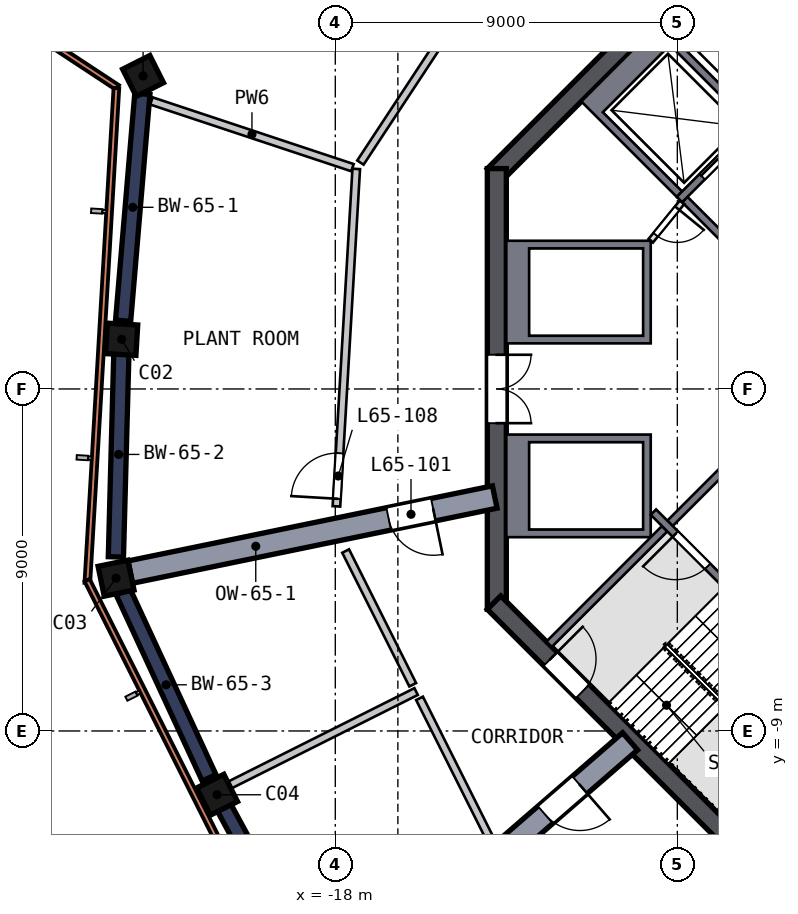
"""IFC4 building model, lengths in metres.
Left out: names, types, materials, properties, quantities, classifications, styles, units other than length and angle.
Written with IfcOpenShell. Run it as: python <this file> out.ifc"""

import sys

from ifc_helpers import new_model, si_unit, direction, frame, frame_2d, origin, origin_2d, place, context, subcontext, project, spatial, polyline, rectangle, outline, extrude, element, fill, save


model = new_model("IFC4")
c1 = context("Model", 3, precision=1e-05, world=origin(), true_north=direction((0.0, 1.0)))
c2 = subcontext(c1, "Body", "Model", "MODEL_VIEW")
j1 = project(units=[si_unit("LENGTHUNIT", "METRE"), si_unit("PLANEANGLEUNIT", "RADIAN")], contexts=[c1])
p1 = place(None, origin())
s1 = spatial("IfcSite", under=j1, at=p1, CompositionType="ELEMENT")
p2 = place(p1, origin())
s2 = spatial("IfcBuilding", under=s1, at=p2, CompositionType="ELEMENT")
p3 = place(p2, frame((0.0, 0.0, 263.0)))
s3 = spatial("IfcBuildingStorey", under=s2, at=p3, CompositionType="ELEMENT", Elevation=263.0)
p4 = place(p3, frame((-23.031, 8.314, 0.0), z_axis=(-0.022679221, -0.064357024, 0.997669197), x_axis=(-0.449308956, 0.892121569, 0.04733464)))
e1 = element("IfcColumn", 1, at=p4, inside=s3, PredefinedType="COLUMN", context=c2, shape_type="SweptSolid", body=[
    extrude(rectangle(XDim=0.8, YDim=0.8, at=origin_2d()), origin(), (0.0, 0.0, 1.0), 4.51),
])
p5 = place(p3, frame((-23.618, 1.387, 0.0), z_axis=(-0.003302254, -0.065882664, 0.997821913), x_axis=(-0.058334022, -0.996115464, -0.065963048)))
e2 = element("IfcColumn", 2, at=p5, inside=s3, PredefinedType="COLUMN", context=c2, shape_type="SweptSolid", body=[
    extrude(rectangle(XDim=0.8, YDim=0.8, at=origin_2d()), origin(), (0.0, 0.0, 1.0), 4.51),
])
p6 = place(p3, frame((-23.786, -4.9, 0.0), z_axis=(0.014181847, -0.066145867, 0.997709176), x_axis=(-0.20094066, 0.977264945, 0.067646713)))
e3 = element("IfcColumn", 3, at=p6, inside=s3, PredefinedType="COLUMN", context=c2, shape_type="SweptSolid", body=[
    extrude(rectangle(XDim=0.8, YDim=0.8, at=origin_2d()), origin(), (0.0, 0.0, 1.0), 4.51),
])
p7 = place(p3, frame((-21.147, -10.608, 0.0), z_axis=(0.03004517, -0.058682818, 0.997824441), x_axis=(0.447253105, -0.891974541, -0.065924798)))
e4 = element("IfcColumn", 4, at=p7, inside=s3, PredefinedType="COLUMN", context=c2, shape_type="SweptSolid", body=[
    extrude(rectangle(XDim=0.8, YDim=0.8, at=origin_2d()), origin(), (0.0, 0.0, 1.0), 4.51),
])
p8 = place(p3, frame((-5.622, 13.823, 0.0), z_axis=(0.0, 0.0, 1.0), x_axis=(-0.707106781, -0.707106781, 0.0)))
e5 = element("IfcWall", 5, at=p8, inside=s3, PredefinedType="SHEAR", context=c2, shape_type="SweptSolid", body=[
    extrude(rectangle(XDim=11.598, YDim=0.5, at=frame_2d((5.799, 0.0))), origin(), (0.0, 0.0, 1.0), 6.0),
])
p9 = place(p3, frame((-13.75, 5.799, 0.0), z_axis=(0.0, 0.0, 1.0), x_axis=(0.0, -1.0, 0.0)))
e6 = element("IfcWall", 6, at=p9, inside=s3, PredefinedType="SHEAR", context=c2, shape_type="SweptSolid", body=[
    extrude(rectangle(XDim=11.598, YDim=0.5, at=frame_2d((5.799, 0.0))), origin(), (0.0, 0.0, 1.0), 6.0),
])
p10 = place(p9, frame((4.899, 0.0, 0.0)))
e7 = element("IfcOpeningElement", 7, at=p10, cuts=e6, PredefinedType="OPENING", context=c2, shape_type="SweptSolid", body=[
    extrude(rectangle(XDim=1.8, YDim=2.1, at=frame_2d((0.9, 1.05))), frame((0.0, 0.26, 0.0), z_axis=(0.0, -1.0, 0.0), x_axis=(1.0, 0.0, 0.0)), (0.0, 0.0, 1.0), 0.52),
])
p11 = place(p3, frame((-13.823, -5.622, 0.0), z_axis=(0.0, 0.0, 1.0), x_axis=(0.707106781, -0.707106781, 0.0)))
e8 = element("IfcWall", 8, at=p11, inside=s3, PredefinedType="SHEAR", context=c2, shape_type="SweptSolid", body=[
    extrude(rectangle(XDim=11.598, YDim=0.5, at=frame_2d((5.799, 0.0))), origin(), (0.0, 0.0, 1.0), 6.0),
])
p12 = place(p11, frame((2.099, 0.0, 0.0)))
e9 = element("IfcOpeningElement", 9, at=p12, cuts=e8, PredefinedType="OPENING", context=c2, shape_type="SweptSolid", body=[
    extrude(rectangle(XDim=1.2, YDim=2.1, at=frame_2d((0.6, 1.05))), frame((0.0, 0.26, 0.0), z_axis=(0.0, -1.0, 0.0), x_axis=(1.0, 0.0, 0.0)), (0.0, 0.0, 1.0), 0.52),
])
p13 = place(p3, frame((-23.077, 7.766, 0.0), z_axis=(0.0, 0.0, 1.0), x_axis=(-0.084417709, -0.996430454, 0.0)))
e10 = element("IfcWall", 10, at=p13, inside=s3, PredefinedType="SHEAR", context=c2, shape_type="SweptSolid", body=[
    extrude(rectangle(XDim=5.992, YDim=0.4, at=frame_2d((2.996, 0.0))), origin(), (0.0, 0.0, 1.0), 4.5),
])
p14 = place(p3, frame((-23.629, 0.974, 0.0), z_axis=(0.0, 0.0, 1.0), x_axis=(-0.026832631, -0.99963994, 0.0)))
e11 = element("IfcWall", 11, at=p14, inside=s3, PredefinedType="SHEAR", context=c2, shape_type="SweptSolid", body=[
    extrude(rectangle(XDim=5.396, YDim=0.4, at=frame_2d((2.698, 0.0))), origin(), (0.0, 0.0, 1.0), 4.5),
])
p15 = place(p3, frame((-23.585, -5.336, 0.0), z_axis=(0.0, 0.0, 1.0), x_axis=(0.419749551, -0.90763997, 0.0)))
e12 = element("IfcWall", 12, at=p15, inside=s3, PredefinedType="SHEAR", context=c2, shape_type="SweptSolid", body=[
    extrude(rectangle(XDim=5.396, YDim=0.4, at=frame_2d((2.698, 0.0))), origin(), (0.0, 0.0, 1.0), 4.5),
])
p16 = place(p3, frame((-20.95, -10.971, 0.0), z_axis=(0.0, 0.0, 1.0), x_axis=(0.476596513, -0.879122155, 0.0)))
e13 = element("IfcWall", 13, at=p16, inside=s3, PredefinedType="SHEAR", context=c2, shape_type="SweptSolid", body=[
    extrude(rectangle(XDim=5.396, YDim=0.4, at=frame_2d((2.698, 0.0))), origin(), (0.0, 0.0, 1.0), 4.5),
])
p17 = place(p3, frame((-13.804, -2.844, 0.0), z_axis=(0.0, 0.0, 1.0), x_axis=(-0.979429804, -0.201785179, 0.0)))
e14 = element("IfcWall", 14, at=p17, inside=s3, PredefinedType="SHEAR", context=c2, shape_type="SweptSolid", body=[
    extrude(rectangle(XDim=9.792, YDim=0.6, at=frame_2d((4.896, 0.0))), origin(), (0.0, 0.0, 1.0), 4.5),
])
p18 = place(p17, frame((1.65, 0.0, 0.0)))
e15 = element("IfcOpeningElement", 15, at=p18, cuts=e14, PredefinedType="OPENING", context=c2, shape_type="SweptSolid", body=[
    extrude(rectangle(XDim=1.2, YDim=2.1, at=frame_2d((0.6, 1.05))), frame((0.0, 0.31, 0.0), z_axis=(0.0, -1.0, 0.0), x_axis=(1.0, 0.0, 0.0)), (0.0, 0.0, 1.0), 0.62),
])
p19 = place(p3, frame((-10.243, -9.273, 0.0), z_axis=(0.0, 0.0, 1.0), x_axis=(-0.755466645, -0.65518711, 0.0)))
e16 = element("IfcWall", 16, at=p19, inside=s3, PredefinedType="SHEAR", context=c2, shape_type="SweptSolid", body=[
    extrude(rectangle(XDim=10.07, YDim=0.6, at=frame_2d((5.035, 0.0))), origin(), (0.0, 0.0, 1.0), 4.5),
])
p20 = place(p19, frame((1.75, 0.0, 0.0)))
e17 = element("IfcOpeningElement", 17, at=p20, cuts=e16, PredefinedType="OPENING", context=c2, shape_type="SweptSolid", body=[
    extrude(rectangle(XDim=1.2, YDim=2.1, at=frame_2d((0.6, 1.05))), frame((0.0, 0.31, 0.0), z_axis=(0.0, -1.0, 0.0), x_axis=(1.0, 0.0, 0.0)), (0.0, 0.0, 1.0), 0.62),
])
p21 = place(p3, frame((-29.628, 11.814, 0.0), z_axis=(0.0, 0.0, 1.0), x_axis=(0.835228586, -0.549902909, 0.0)))
e18 = element("IfcWall", 18, at=p21, inside=s3, PredefinedType="SOLIDWALL", context=c2, shape_type="SweptSolid", body=[
    extrude(rectangle(XDim=7.06, YDim=0.15, at=frame_2d((3.53, 0.0))), origin(), (0.0, 0.0, 1.0), 4.5),
])
p22 = place(p3, frame((-23.76, 7.918, 0.0), z_axis=(0.0, 0.0, 1.0), x_axis=(-0.058610129, -0.998280949, 0.0)))
e19 = element("IfcWall", 19, at=p22, inside=s3, PredefinedType="SOLIDWALL", context=c2, shape_type="SweptSolid", body=[
    extrude(rectangle(XDim=13.046, YDim=0.15, at=frame_2d((6.523, 0.0))), origin(), (0.0, 0.0, 1.0), 4.5),
])
p23 = place(p3, frame((-24.531, -5.033, 0.0), z_axis=(0.0, 0.0, 1.0), x_axis=(0.448374471, -0.893845811, 0.0)))
e20 = element("IfcWall", 20, at=p23, inside=s3, PredefinedType="SOLIDWALL", context=c2, shape_type="SweptSolid", body=[
    extrude(rectangle(XDim=13.035, YDim=0.15, at=frame_2d((6.518, 0.0))), origin(), (0.0, 0.0, 1.0), 4.5),
])
p24 = place(p3, origin())
e21 = element("IfcWall", 21, at=p24, inside=s3, PredefinedType="SOLIDWALL", context=c2, shape_type="SweptSolid", body=[
    extrude(outline(polyline([(-13.5, 1.2), (-13.5, 3.9), (-9.7, 3.9), (-9.7, 1.2), (-13.5, 1.2)]), holes=[polyline([(-9.9, 3.7), (-12.9, 3.7), (-12.9, 1.4), (-9.9, 1.4), (-9.9, 3.7)])]), origin(), (0.0, 0.0, 1.0), 5.55),
])
p25 = place(p3, origin())
e22 = element("IfcWall", 22, at=p25, inside=s3, PredefinedType="SOLIDWALL", context=c2, shape_type="SweptSolid", body=[
    extrude(outline(polyline([(-9.7, -3.9), (-13.5, -3.9), (-13.5, -1.2), (-9.7, -1.2), (-9.7, -3.9)]), holes=[polyline([(-12.9, -1.4), (-12.9, -3.7), (-9.9, -3.7), (-9.9, -1.4), (-12.9, -1.4)])]), origin(), (0.0, 0.0, 1.0), 5.55),
])
p26 = place(p3, origin())
e23 = element("IfcWall", 23, at=p26, inside=s3, PredefinedType="SOLIDWALL", context=c2, shape_type="SweptSolid", body=[
    extrude(outline(polyline([(-9.617, 9.475), (-7.566, 11.526), (-5.056, 9.016), (-5.197, 8.874), (-7.283, 10.96), (-9.051, 9.192), (-6.965, 7.106), (-7.106, 6.965), (-9.617, 9.475)])), origin(), (0.0, 0.0, 1.0), 5.55),
])
p27 = place(p3, origin())
e24 = element("IfcWall", 24, at=p27, inside=s3, PredefinedType="SOLIDWALL", context=c2, shape_type="SweptSolid", body=[
    extrude(outline(polyline([(-11.526, 7.566), (-9.617, 9.475), (-9.192, 9.051), (-10.96, 7.283), (-8.874, 5.197), (-9.016, 5.056), (-11.526, 7.566)])), origin(), (0.0, 0.0, 1.0), 5.55),
])
p28 = place(p3, frame((-7.036, 6.894, 0.0), z_axis=(0.0, 0.0, 1.0), x_axis=(-0.707106781, -0.707106781, 0.0)))
e25 = element("IfcWall", 25, at=p28, inside=s3, PredefinedType="SOLIDWALL", context=c2, shape_type="SweptSolid", body=[
    extrude(rectangle(XDim=2.7, YDim=0.2, at=frame_2d((1.35, 0.0))), origin(), (0.0, 0.0, 1.0), 5.55),
])
p29 = place(p28, frame((0.65, 0.0, 0.0)))
e26 = element("IfcOpeningElement", 26, at=p29, cuts=e25, PredefinedType="OPENING", context=c2, shape_type="SweptSolid", body=[
    extrude(rectangle(XDim=1.2, YDim=2.1, at=frame_2d((0.6, 1.05))), frame((0.0, 0.11, 0.0), z_axis=(0.0, -1.0, 0.0), x_axis=(1.0, 0.0, 0.0)), (0.0, 0.0, 1.0), 0.22),
])
p30 = place(p3, frame((-3.535, -9.334, 0.0), z_axis=(0.0, 0.0, 1.0), x_axis=(-0.707120946, 0.707092617, 0.0)))
e27 = element("IfcWall", 27, at=p30, inside=s3, PredefinedType="SOLIDWALL", context=c2, shape_type="SweptSolid", body=[
    extrude(rectangle(XDim=8.618, YDim=0.2, at=frame_2d((4.309, 0.0))), origin(), (0.0, 0.0, 1.0), 5.55),
])
p31 = place(p30, frame((6.6, 0.0, 0.0)))
e28 = element("IfcOpeningElement", 28, at=p31, cuts=e27, PredefinedType="OPENING", context=c2, shape_type="SweptSolid", body=[
    extrude(rectangle(XDim=1.2, YDim=2.1, at=frame_2d((0.6, 1.05))), frame((0.0, 0.11, 0.0), z_axis=(0.0, -1.0, 0.0), x_axis=(1.0, 0.0, 0.0)), (0.0, 0.0, 1.0), 0.22),
])
p32 = place(p3, frame((-9.334, -3.677, 0.0), z_axis=(0.0, 0.0, 1.0), x_axis=(-0.707135168, -0.707078393, 0.0)))
e29 = element("IfcWall", 29, at=p32, inside=s3, PredefinedType="SOLIDWALL", context=c2, shape_type="SweptSolid", body=[
    extrude(rectangle(XDim=4.3, YDim=0.2, at=frame_2d((2.15, 0.0))), origin(), (0.0, 0.0, 1.0), 5.55),
])
p33 = place(p3, frame((-6.823, 3.005, 0.0), z_axis=(0.0, 0.0, 1.0), x_axis=(-0.707106781, 0.707106781, 0.0)))
e30 = element("IfcWall", 30, at=p33, inside=s3, PredefinedType="SOLIDWALL", context=c2, shape_type="SweptSolid", body=[
    extrude(rectangle(XDim=2.8, YDim=0.2, at=frame_2d((1.4, 0.0))), origin(), (0.0, 0.0, 1.0), 5.55),
])
p34 = place(p3, frame((-8.874, 4.914, 0.0), z_axis=(0.0, 0.0, 1.0), x_axis=(-0.631274009, -0.775559878, 0.0)))
e31 = element("IfcWall", 31, at=p34, inside=s3, PredefinedType="PARTITIONING", context=c2, shape_type="SweptSolid", body=[
    extrude(rectangle(XDim=1.308, YDim=0.15, at=frame_2d((0.654, 0.0))), origin(), (0.0, 0.0, 1.0), 5.55),
])
p35 = place(p34, frame((0.204, 0.0, 0.0)))
e32 = element("IfcOpeningElement", 32, at=p35, cuts=e31, PredefinedType="OPENING", context=c2, shape_type="SweptSolid", body=[
    extrude(rectangle(XDim=0.9, YDim=2.1, at=frame_2d((0.45, 1.05))), frame((0.0, 0.085, 0.0), z_axis=(0.0, -1.0, 0.0), x_axis=(1.0, 0.0, 0.0)), (0.0, 0.0, 1.0), 0.17),
])
p36 = place(p3, frame((-7.708, -2.051, 0.0), z_axis=(0.0, 0.0, 1.0), x_axis=(-0.707106781, -0.707106781, 0.0)))
e33 = element("IfcWall", 33, at=p36, inside=s3, PredefinedType="SOLIDWALL", context=c2, shape_type="SweptSolid", body=[
    extrude(rectangle(XDim=2.1, YDim=0.2, at=frame_2d((1.05, 0.0))), origin(), (0.0, 0.0, 1.0), 5.55),
])
p37 = place(p3, frame((-17.547, 5.823, 0.0), z_axis=(0.0, 0.0, 1.0), x_axis=(-0.949094078, 0.314992748, 0.0)))
e34 = element("IfcWall", 34, at=p37, inside=s3, PredefinedType="SOLIDWALL", context=c2, shape_type="SweptSolid", body=[
    extrude(rectangle(XDim=5.576, YDim=0.2, at=frame_2d((2.788, 0.0))), origin(), (0.0, 0.0, 1.0), 4.5),
])
p38 = place(p3, frame((-15.873, -7.963, 0.0), z_axis=(0.0, 0.0, 1.0), x_axis=(-0.893842016, -0.448382037, 0.0)))
e35 = element("IfcWall", 35, at=p38, inside=s3, PredefinedType="SOLIDWALL", context=c2, shape_type="SweptSolid", body=[
    extrude(rectangle(XDim=6.35, YDim=0.2, at=frame_2d((3.175, 0.0))), origin(), (0.0, 0.0, 1.0), 4.5),
])
p39 = place(p3, frame((-17.97, -3.089, 0.0), z_axis=(0.0, 0.0, 1.0), x_axis=(0.05859974, 0.998281559, 0.0)))
e36 = element("IfcWall", 36, at=p39, inside=s3, PredefinedType="SOLIDWALL", context=c2, shape_type="SweptSolid", body=[
    extrude(rectangle(XDim=8.895, YDim=0.2, at=frame_2d((4.448, 0.0))), origin(), (0.0, 0.0, 1.0), 4.5),
])
p40 = place(p39, frame((0.2, 0.0, 0.0)))
e37 = element("IfcOpeningElement", 37, at=p40, cuts=e36, PredefinedType="OPENING", context=c2, shape_type="SweptSolid", body=[
    extrude(rectangle(XDim=1.2, YDim=2.1, at=frame_2d((0.6, 1.05))), frame((0.0, 0.11, 0.0), z_axis=(0.0, -1.0, 0.0), x_axis=(1.0, 0.0, 0.0)), (0.0, 0.0, 1.0), 0.22),
])
p41 = place(p3, frame((-17.728, -4.265, 0.0), z_axis=(0.0, 0.0, 1.0), x_axis=(0.448329575, -0.893868331, 0.0)))
e38 = element("IfcWall", 38, at=p41, inside=s3, PredefinedType="SOLIDWALL", context=c2, shape_type="SweptSolid", body=[
    extrude(rectangle(XDim=3.937, YDim=0.2, at=frame_2d((1.968, 0.0))), origin(), (0.0, 0.0, 1.0), 4.5),
])
p42 = place(p3, frame((-15.783, -8.141, 0.0), z_axis=(0.0, 0.0, 1.0), x_axis=(0.448385612, -0.893840223, 0.0)))
e39 = element("IfcWall", 39, at=p42, inside=s3, PredefinedType="SOLIDWALL", context=c2, shape_type="SweptSolid", body=[
    extrude(rectangle(XDim=4.248, YDim=0.2, at=frame_2d((2.124, 0.0))), origin(), (0.0, 0.0, 1.0), 4.5),
])
p43 = place(p3, frame((-17.339, 5.958, 0.0), z_axis=(0.0, 0.0, 1.0), x_axis=(0.549889366, 0.835237502, 0.0)))
e40 = element("IfcWall", 40, at=p43, inside=s3, PredefinedType="SOLIDWALL", context=c2, shape_type="SweptSolid", body=[
    extrude(rectangle(XDim=9.316, YDim=0.2, at=frame_2d((4.658, 0.0))), origin(), (0.0, 0.0, 1.0), 4.5),
])
p44 = place(p43, frame((3.95, 0.0, 0.0)))
e41 = element("IfcOpeningElement", 41, at=p44, cuts=e40, PredefinedType="OPENING", context=c2, shape_type="SweptSolid", body=[
    extrude(rectangle(XDim=1.2, YDim=2.1, at=frame_2d((0.6, 1.05))), frame((0.0, 0.11, 0.0), z_axis=(0.0, -1.0, 0.0), x_axis=(1.0, 0.0, 0.0)), (0.0, 0.0, 1.0), 0.22),
])
p45 = place(p29, origin())
e42 = element("IfcDoor", 42, at=p45, inside=s3, OperationType="DOUBLE_DOOR_SLIDING", PredefinedType="DOOR", context=c2, shape_type="SweptSolid", body=[
    extrude(rectangle(XDim=1.2, YDim=2.1, at=frame_2d((0.6, 1.05))), frame((0.0, 0.025, 0.0), z_axis=(0.0, -1.0, 0.0), x_axis=(1.0, 0.0, 0.0)), (0.0, 0.0, 1.0), 0.05),
])
fill(e26, e42)
p46 = place(p31, origin())
e43 = element("IfcDoor", 43, at=p46, inside=s3, OperationType="SINGLE_SWING_RIGHT", PredefinedType="DOOR", context=c2, shape_type="SweptSolid", body=[
    extrude(rectangle(XDim=1.2, YDim=2.1, at=frame_2d((0.6, 1.05))), frame((0.0, 0.025, 0.0), z_axis=(0.0, -1.0, 0.0), x_axis=(1.0, 0.0, 0.0)), (0.0, 0.0, 1.0), 0.05),
])
fill(e28, e43)
p47 = place(p10, origin())
e44 = element("IfcDoor", 44, at=p47, inside=s3, OperationType="DOUBLE_DOOR_SINGLE_SWING", PredefinedType="DOOR", context=c2, shape_type="SweptSolid", body=[
    extrude(rectangle(XDim=1.8, YDim=2.1, at=frame_2d((0.9, 1.05))), frame((0.0, 0.025, 0.0), z_axis=(0.0, -1.0, 0.0), x_axis=(1.0, 0.0, 0.0)), (0.0, 0.0, 1.0), 0.05),
])
fill(e7, e44)
p48 = place(p12, origin())
e45 = element("IfcDoor", 45, at=p48, inside=s3, OperationType="SINGLE_SWING_LEFT", PredefinedType="DOOR", context=c2, shape_type="SweptSolid", body=[
    extrude(rectangle(XDim=1.2, YDim=2.1, at=frame_2d((0.6, 1.05))), frame((0.0, 0.025, 0.0), z_axis=(0.0, -1.0, 0.0), x_axis=(1.0, 0.0, 0.0)), (0.0, 0.0, 1.0), 0.05),
])
fill(e9, e45)
p49 = place(p35, origin())
e46 = element("IfcDoor", 46, at=p49, inside=s3, OperationType="SINGLE_SWING_LEFT", PredefinedType="DOOR", context=c2, shape_type="SweptSolid", body=[
    extrude(rectangle(XDim=0.9, YDim=2.1, at=frame_2d((0.45, 1.05))), frame((0.0, 0.025, 0.0), z_axis=(0.0, -1.0, 0.0), x_axis=(1.0, 0.0, 0.0)), (0.0, 0.0, 1.0), 0.05),
])
fill(e32, e46)
p50 = place(p18, origin())
e47 = element("IfcDoor", 47, at=p50, inside=s3, OperationType="SINGLE_SWING_LEFT", PredefinedType="DOOR", context=c2, shape_type="SweptSolid", body=[
    extrude(rectangle(XDim=1.2, YDim=2.1, at=frame_2d((0.6, 1.05))), frame((0.0, 0.025, 0.0), z_axis=(0.0, -1.0, 0.0), x_axis=(1.0, 0.0, 0.0)), (0.0, 0.0, 1.0), 0.05),
])
fill(e15, e47)
p51 = place(p20, origin())
e48 = element("IfcDoor", 48, at=p51, inside=s3, OperationType="SINGLE_SWING_LEFT", PredefinedType="DOOR", context=c2, shape_type="SweptSolid", body=[
    extrude(rectangle(XDim=1.2, YDim=2.1, at=frame_2d((0.6, 1.05))), frame((0.0, 0.025, 0.0), z_axis=(0.0, -1.0, 0.0), x_axis=(1.0, 0.0, 0.0)), (0.0, 0.0, 1.0), 0.05),
])
fill(e17, e48)
p52 = place(p40, origin())
e49 = element("IfcDoor", 49, at=p52, inside=s3, OperationType="SINGLE_SWING_LEFT", PredefinedType="DOOR", context=c2, shape_type="SweptSolid", body=[
    extrude(rectangle(XDim=1.2, YDim=2.1, at=frame_2d((0.6, 1.05))), frame((0.0, 0.025, 0.0), z_axis=(0.0, -1.0, 0.0), x_axis=(1.0, 0.0, 0.0)), (0.0, 0.0, 1.0), 0.05),
])
fill(e37, e49)
save(model, sys.argv[1])
